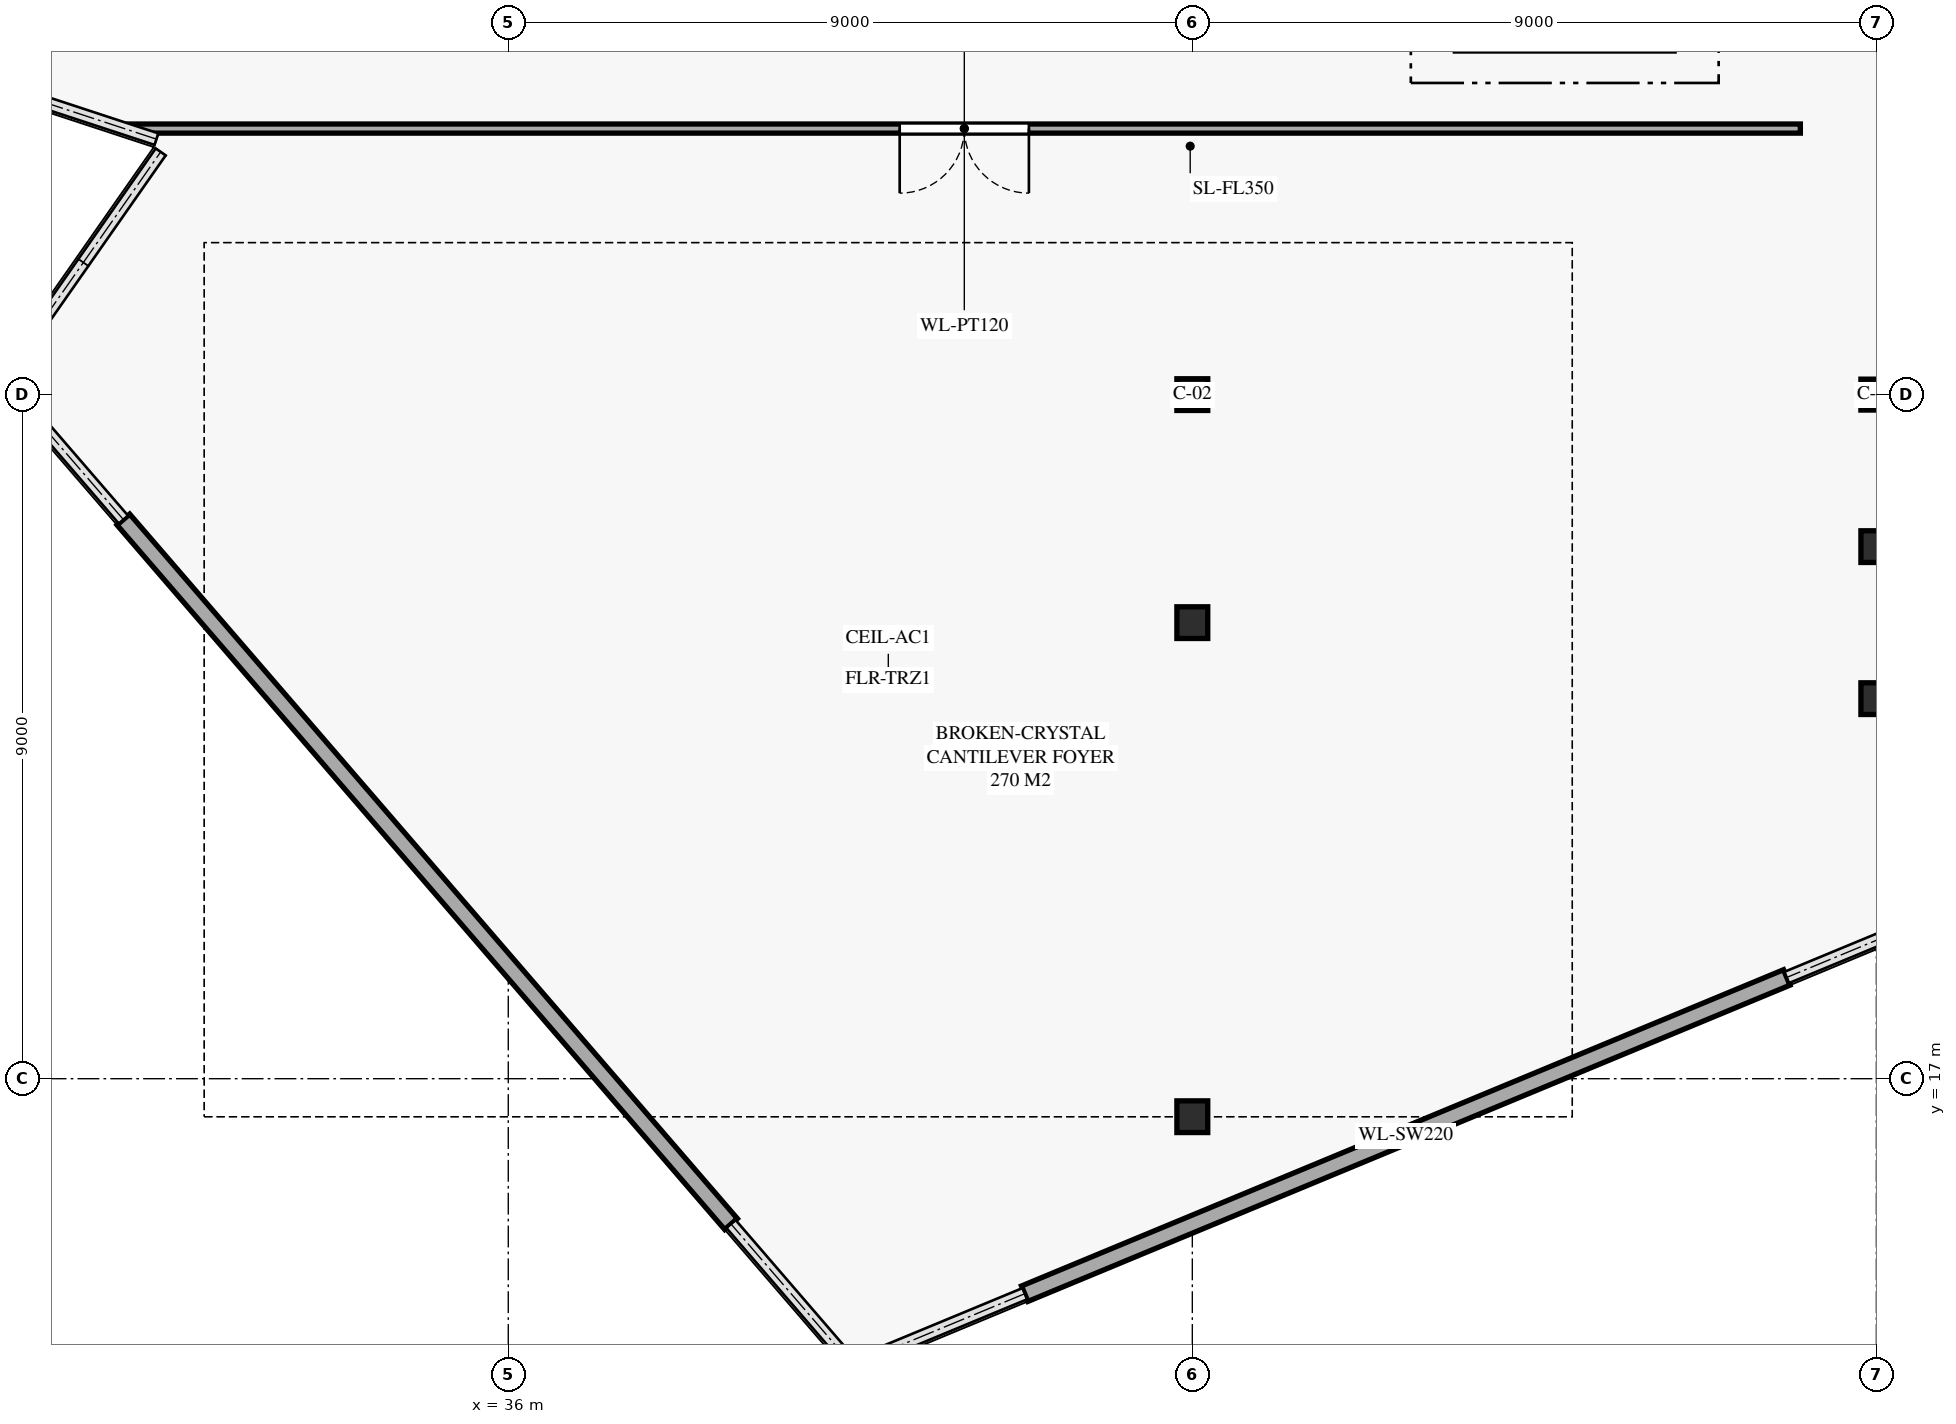
"""IFC4 building model, lengths in metres.
Left out: names, types, materials, properties, quantities, classifications, styles, units other than length and angle.
Written with IfcOpenShell. Run it as: python <this file> out.ifc"""

import sys

from ifc_helpers import new_model, si_unit, direction, frame, frame_2d, origin, origin_2d, place, context, subcontext, project, spatial, rectangle, hollow_rectangle, i_section, extrude, element, fill, save


model = new_model("IFC4")
c1 = context("Model", 3, precision=1e-05, world=origin(), true_north=direction((0.0, 1.0)))
c2 = subcontext(c1, "Body", "Model", "MODEL_VIEW")
j1 = project(units=[si_unit("LENGTHUNIT", "METRE"), si_unit("PLANEANGLEUNIT", "RADIAN")], contexts=[c1])
p1 = place(None, origin())
s1 = spatial("IfcSite", under=j1, at=p1, CompositionType="ELEMENT")
p2 = place(p1, origin())
s2 = spatial("IfcBuilding", under=s1, at=p2, CompositionType="ELEMENT")
p3 = place(p2, frame((0.0, 0.0, 10.0)))
s3 = spatial("IfcBuildingStorey", under=s2, at=p3, CompositionType="ELEMENT", Elevation=10.0)
p4 = place(p3, frame((45.0, 26.0, 0.0), z_axis=(0.0, 0.0, 1.0), x_axis=(1.0, 0.0, 0.0)))
e1 = element("IfcColumn", 1, at=p4, inside=s3, PredefinedType="COLUMN", context=c2, shape_type="SweptSolid", body=[
    extrude(i_section(OverallWidth=0.406, OverallDepth=0.417, WebThickness=0.03, FlangeThickness=0.048, FilletRadius=0.018, at=origin_2d()), origin(), (0.0, 0.0, 1.0), 5.0),
])
p5 = place(p3, frame((54.0, 26.0, 0.0), z_axis=(0.0, 0.0, 1.0), x_axis=(1.0, 0.0, 0.0)))
e2 = element("IfcColumn", 2, at=p5, inside=s3, PredefinedType="COLUMN", context=c2, shape_type="SweptSolid", body=[
    extrude(hollow_rectangle(XDim=0.406, YDim=0.406, WallThickness=0.015, InnerFilletRadius=0.015, OuterFilletRadius=0.03, at=origin_2d()), origin(), (0.0, 0.0, 1.0), 5.0),
])
for number, where, z_axis, x_axis in (
    (3, (45.0, 16.5, -0.896), (0.0, 0.0, 1.0), (1.0, 0.0, 0.0)),
    (4, (45.0, 23.0, -0.896), (0.0, 0.0, 1.0), (1.0, 0.0, 0.0)),
    (5, (54.0, 22.0, -0.896), (0.0, 0.0, 1.0), (1.0, 0.0, 0.0)),
    (6, (54.0, 24.0, -0.896), (0.0, 0.0, 1.0), (1.0, 0.0, 0.0)),
):
    element("IfcColumn", number, at=place(p3, frame(where, z_axis=z_axis, x_axis=x_axis)), inside=s3, PredefinedType="COLUMN", context=c2, shape_type="SweptSolid", body=[
        extrude(i_section(OverallWidth=0.406, OverallDepth=0.417, WebThickness=0.03, FlangeThickness=0.048, FilletRadius=0.018, at=origin_2d()), origin(), (0.0, 0.0, 1.0), 5.025),
    ])
p6 = place(p3, frame((52.821, 18.332, 0.0), z_axis=(0.0, 0.0, 1.0), x_axis=(-0.923632226949, -0.383279936001, 0.0)))
e7 = element("IfcWall", 7, at=p6, inside=s3, PredefinedType="SOLIDWALL", context=c2, shape_type="SweptSolid", body=[
    extrude(rectangle(XDim=10.855, YDim=0.22, at=frame_2d((5.428, 0.0))), origin(), (0.0, 0.0, 1.0), 4.675),
])
p7 = place(p3, frame((38.931, 15.088, 0.0), z_axis=(0.0, 0.0, 1.0), x_axis=(-0.653161731362, 0.757218431289, 0.0)))
e8 = element("IfcWall", 8, at=p7, inside=s3, PredefinedType="SOLIDWALL", context=c2, shape_type="SweptSolid", body=[
    extrude(rectangle(XDim=12.24, YDim=0.22, at=frame_2d((6.12, 0.0))), origin(), (0.0, 0.0, 1.0), 4.675),
])
p8 = place(p3, frame((53.0, 29.5, 0.0), z_axis=(0.0, 0.0, 1.0), x_axis=(-1.0, 0.0, 0.0)))
e9 = element("IfcWall", 9, at=p8, inside=s3, PredefinedType="PARTITIONING", context=c2, shape_type="SweptSolid", body=[
    extrude(rectangle(XDim=22.0, YDim=0.12, at=frame_2d((11.0, 0.0))), origin(), (0.0, 0.0, 1.0), 4.675),
])
p9 = place(p8, frame((10.15, 0.0, 0.0)))
e10 = element("IfcOpeningElement", 10, at=p9, cuts=e9, PredefinedType="OPENING", context=c2, shape_type="SweptSolid", body=[
    extrude(rectangle(XDim=1.7, YDim=2.2, at=frame_2d((0.85, 1.1))), frame((0.0, 0.07, 0.0), z_axis=(0.0, -1.0, 0.0), x_axis=(1.0, 0.0, 0.0)), (0.0, 0.0, 1.0), 0.14),
])
p10 = place(p9, origin())
e11 = element("IfcDoor", 11, at=p10, inside=s3, OperationType="DOUBLE_DOOR_SINGLE_SWING", PredefinedType="DOOR", context=c2, shape_type="SweptSolid", body=[
    extrude(rectangle(XDim=1.7, YDim=2.2, at=frame_2d((0.85, 1.1))), frame((0.0, 0.025, 0.0), z_axis=(0.0, -1.0, 0.0), x_axis=(1.0, 0.0, 0.0)), (0.0, 0.0, 1.0), 0.05),
])
fill(e10, e11)
save(model, sys.argv[1])
